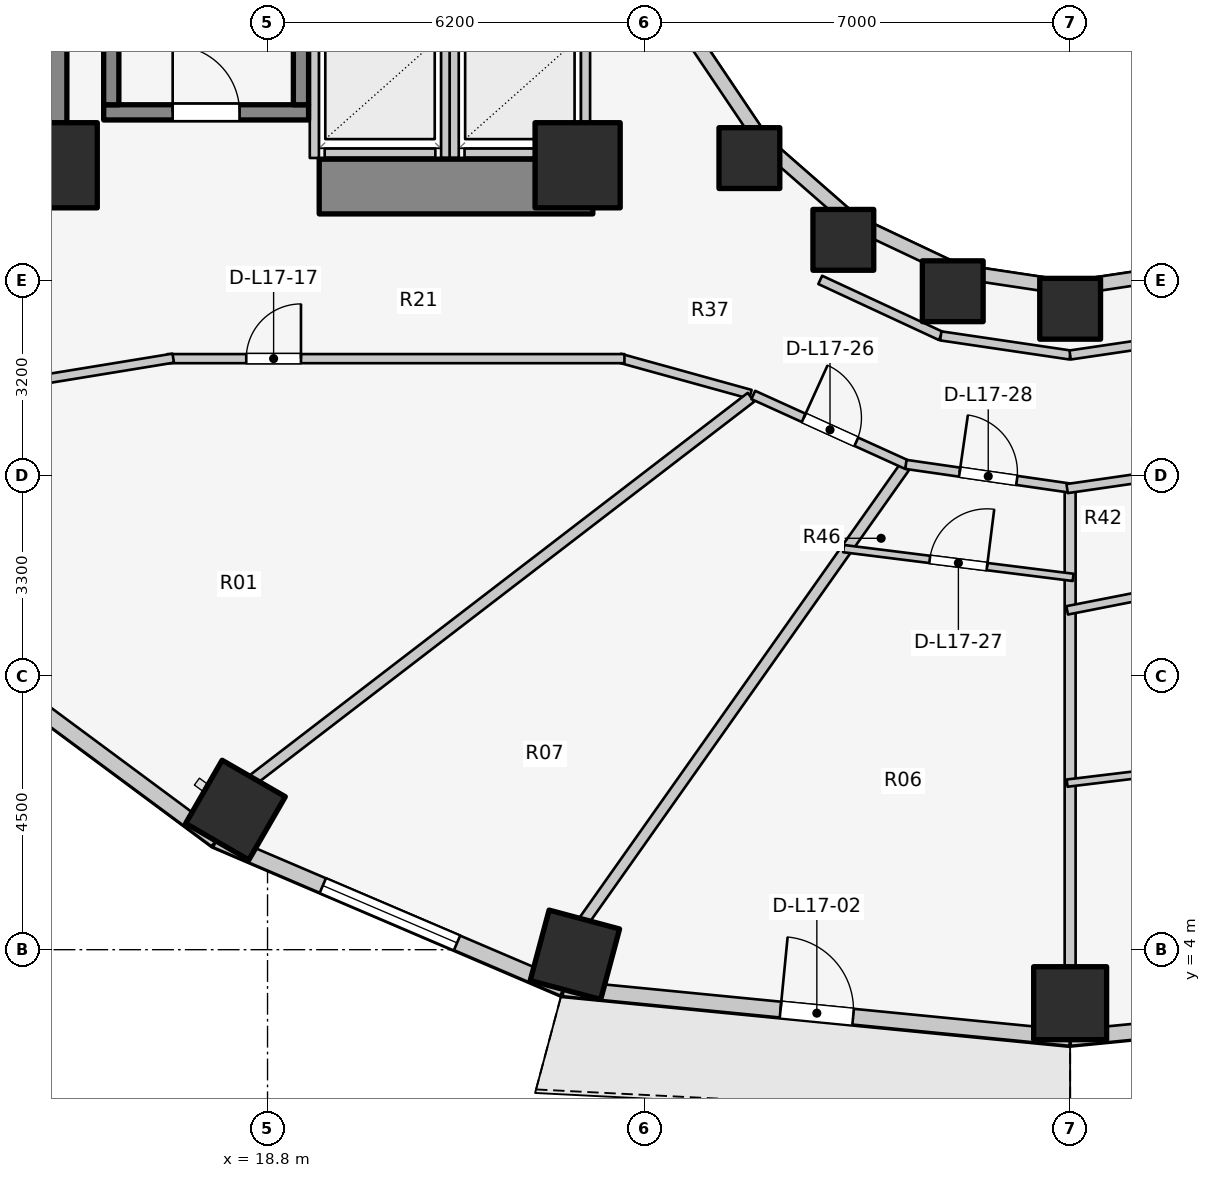
"""IFC4 building model, lengths in metres.
Left out: names, types, materials, properties, quantities, classifications, styles, units other than length and angle.
Written with IfcOpenShell. Run it as: python <this file> out.ifc"""

import sys

from ifc_helpers import new_model, si_unit, direction, frame, frame_2d, origin, origin_2d, place, context, subcontext, project, spatial, rectangle, extrude, element, fill, save


model = new_model("IFC4")
c1 = context("Model", 3, precision=1e-05, world=origin(), true_north=direction((0.0, 1.0)))
c2 = subcontext(c1, "Body", "Model", "MODEL_VIEW")
j1 = project(units=[si_unit("LENGTHUNIT", "METRE"), si_unit("PLANEANGLEUNIT", "RADIAN")], contexts=[c1])
p1 = place(None, origin())
s1 = spatial("IfcSite", under=j1, at=p1, CompositionType="ELEMENT")
p2 = place(p1, origin())
s2 = spatial("IfcBuilding", under=s1, at=p2, CompositionType="ELEMENT")
p3 = place(p2, frame((0.0, 0.0, 58.6)))
s3 = spatial("IfcBuildingStorey", under=s2, at=p3, CompositionType="ELEMENT", Elevation=58.6)
p4 = place(p3, frame((15.05, 17.05, 0.0), z_axis=(0.0, 0.0, 1.0), x_axis=(0.0, 1.0, 0.0)))
e1 = element("IfcWall", 1, at=p4, inside=s3, PredefinedType="SHEAR", context=c2, shape_type="SweptSolid", body=[
    extrude(rectangle(XDim=12.8, YDim=0.9, at=frame_2d((6.4, 0.0))), origin(), (0.0, 0.0, 1.0), 3.1),
])
p5 = place(p3, frame((19.65, 16.55, 0.0), z_axis=(0.0, 0.0, 1.0), x_axis=(1.0, 0.0, 0.0)))
e2 = element("IfcWall", 2, at=p5, inside=s3, PredefinedType="SHEAR", context=c2, shape_type="SweptSolid", body=[
    extrude(rectangle(XDim=4.5, YDim=0.9, at=frame_2d((2.25, 0.0))), origin(), (0.0, 0.0, 1.0), 3.1),
])
p6 = place(p3, frame((16.105, 17.77, 0.0), z_axis=(0.0, 0.0, 1.0), x_axis=(1.0, 0.0, 0.0)))
e3 = element("IfcWall", 3, at=p6, inside=s3, PredefinedType="SOLIDWALL", context=c2, shape_type="SweptSolid", body=[
    extrude(rectangle(XDim=3.37, YDim=0.25, at=frame_2d((1.685, 0.0))), origin(), (0.0, 0.0, 1.0), 3.1),
])
p7 = place(p6, frame((1.135, 0.0, 0.0)))
e4 = element("IfcOpeningElement", 4, at=p7, cuts=e3, PredefinedType="OPENING", context=c2, shape_type="SweptSolid", body=[
    extrude(rectangle(XDim=1.1, YDim=2.1, at=frame_2d((0.55, 1.05))), frame((0.0, 0.135, 0.0), z_axis=(0.0, -1.0, 0.0), x_axis=(1.0, 0.0, 0.0)), (0.0, 0.0, 1.0), 0.27),
])
for number, where, z_axis, x_axis in (
    (5, (16.23, 17.895, 0.0), (0.0, 0.0, 1.0), (0.0, 1.0, 0.0)),
    (6, (19.35, 17.895, 0.0), (0.0, 0.0, 1.0), (0.0, 1.0, 0.0)),
):
    element("IfcWall", number, at=place(p3, frame(where, z_axis=z_axis, x_axis=x_axis)), inside=s3, PredefinedType="SOLIDWALL", context=c2, shape_type="SweptSolid", body=[
        extrude(rectangle(XDim=7.81, YDim=0.25, at=frame_2d((3.905, 0.0))), origin(), (0.0, 0.0, 1.0), 3.1),
    ])
for number, where, z_axis, x_axis in (
    (7, (15.3, 16.9, 0.0), (0.0, 0.0, 1.0), (1.0, 0.0, 0.0)),
    (8, (23.9, 16.9, 0.0), (0.0, 0.0, 1.0), (1.0, 0.0, 0.0)),
):
    element("IfcColumn", number, at=place(p3, frame(where, z_axis=z_axis, x_axis=x_axis)), inside=s3, PredefinedType="COLUMN", context=c2, shape_type="SweptSolid", body=[
        extrude(rectangle(XDim=1.4, YDim=1.4, at=origin_2d()), origin(), (0.0, 0.0, 1.0), 3.1),
    ])
for number, where, z_axis, x_axis in (
    (9, (26.725, 17.018, 0.0), (0.0, 0.0, 1.0), (1.0, 0.0, 0.0)),
    (10, (28.27, 15.673, 0.0), (0.0, 0.0, 1.0), (1.0, 0.0, 0.0)),
):
    element("IfcColumn", number, at=place(p3, frame(where, z_axis=z_axis, x_axis=x_axis)), inside=s3, PredefinedType="COLUMN", context=c2, shape_type="SweptSolid", body=[
        extrude(rectangle(XDim=1.0, YDim=1.0, at=origin_2d()), origin(), (0.0, 0.0, 1.0), 3.1),
    ])
p8 = place(p3, frame((18.273, 6.296, 0.0), z_axis=(0.0, 0.0, 1.0), x_axis=(-0.5, -0.866025403784, 0.0)))
e11 = element("IfcColumn", 11, at=p8, inside=s3, PredefinedType="COLUMN", context=c2, shape_type="SweptSolid", body=[
    extrude(rectangle(XDim=1.2, YDim=1.2, at=origin_2d()), origin(), (0.0, 0.0, 1.0), 3.1),
])
p9 = place(p3, frame((30.069, 14.828, 0.0), z_axis=(0.0, 0.0, 1.0), x_axis=(1.0, 0.0, 0.0)))
e12 = element("IfcColumn", 12, at=p9, inside=s3, PredefinedType="COLUMN", context=c2, shape_type="SweptSolid", body=[
    extrude(rectangle(XDim=1.0, YDim=1.0, at=origin_2d()), origin(), (0.0, 0.0, 1.0), 3.1),
])
p10 = place(p3, frame((23.855, 3.916, 0.0), z_axis=(0.0, 0.0, 1.0), x_axis=(-0.258819045103, -0.965925826289, 0.0)))
e13 = element("IfcColumn", 13, at=p10, inside=s3, PredefinedType="COLUMN", context=c2, shape_type="SweptSolid", body=[
    extrude(rectangle(XDim=1.2, YDim=1.2, at=origin_2d()), origin(), (0.0, 0.0, 1.0), 3.1),
])
p11 = place(p3, frame((32.0, 14.54, 0.0), z_axis=(0.0, 0.0, 1.0), x_axis=(1.0, 0.0, 0.0)))
e14 = element("IfcColumn", 14, at=p11, inside=s3, PredefinedType="COLUMN", context=c2, shape_type="SweptSolid", body=[
    extrude(rectangle(XDim=1.0, YDim=1.0, at=origin_2d()), origin(), (0.0, 0.0, 1.0), 3.1),
])
p12 = place(p3, frame((32.0, 3.12, 0.0), z_axis=(0.0, 0.0, 1.0), x_axis=(0.0, -1.0, 0.0)))
e15 = element("IfcColumn", 15, at=p12, inside=s3, PredefinedType="COLUMN", context=c2, shape_type="SweptSolid", body=[
    extrude(rectangle(XDim=1.2, YDim=1.2, at=origin_2d()), origin(), (0.0, 0.0, 1.0), 3.1),
])
p13 = place(p3, frame((25.834, 18.94, 0.0), z_axis=(0.0, 0.0, 1.0), x_axis=(0.558197800898, -0.829707909492, 0.0)))
e16 = element("IfcWall", 16, at=p13, inside=s3, PredefinedType="STANDARD", context=c2, shape_type="SweptSolid", body=[
    extrude(rectangle(XDim=2.027, YDim=0.23, at=frame_2d((1.013, 0.0))), origin(), (0.0, 0.0, 1.0), 2.16),
])
p14 = place(p3, frame((26.965, 17.258, 0.0), z_axis=(0.0, 0.0, 1.0), x_axis=(0.752576694707, -0.658504607869, 0.0)))
e17 = element("IfcWall", 17, at=p14, inside=s3, PredefinedType="STANDARD", context=c2, shape_type="SweptSolid", body=[
    extrude(rectangle(XDim=1.959, YDim=0.23, at=frame_2d((0.98, 0.0))), origin(), (0.0, 0.0, 1.0), 2.16),
])
p15 = place(p3, frame((28.44, 15.968, 0.0), z_axis=(0.0, 0.0, 1.0), x_axis=(0.904179699603, -0.427152280606, 0.0)))
e18 = element("IfcWall", 18, at=p15, inside=s3, PredefinedType="STANDARD", context=c2, shape_type="SweptSolid", body=[
    extrude(rectangle(XDim=1.899, YDim=0.23, at=frame_2d((0.95, 0.0))), origin(), (0.0, 0.0, 1.0), 2.16),
])
for number, where, z_axis, x_axis in (
    (19, (30.157, 15.157, 0.0), (0.0, 0.0, 1.0), (0.989, -0.149, 0.0)),
    (20, (32.0, 14.88, 0.0), (0.0, 0.0, 1.0), (0.989, 0.149, 0.0)),
):
    element("IfcWall", number, at=place(p3, frame(where, z_axis=z_axis, x_axis=x_axis)), inside=s3, PredefinedType="STANDARD", context=c2, shape_type="SweptSolid", body=[
        extrude(rectangle(XDim=1.864, YDim=0.23, at=frame_2d((0.932, 0.0))), origin(), (0.0, 0.0, 1.0), 2.16),
    ])
p16 = place(p3, frame((13.595, 9.035, 0.0), z_axis=(0.0, 0.0, 1.0), x_axis=(0.803477531792, -0.595335078679, 0.0)))
e21 = element("IfcWall", 21, at=p16, inside=s3, PredefinedType="STANDARD", context=c2, shape_type="SweptSolid", body=[
    extrude(rectangle(XDim=5.43, YDim=0.26, at=frame_2d((2.715, 0.0))), origin(), (0.0, 0.0, 1.0), 2.85),
])
p17 = place(p3, frame((17.958, 5.803, 0.0), z_axis=(0.0, 0.0, 1.0), x_axis=(0.919612132394, -0.39282760335, 0.0)))
e22 = element("IfcWall", 22, at=p17, inside=s3, PredefinedType="STANDARD", context=c2, shape_type="SweptSolid", body=[
    extrude(rectangle(XDim=6.209, YDim=0.26, at=frame_2d((3.105, 0.0))), origin(), (0.0, 0.0, 1.0), 2.85),
])
p18 = place(p17, frame((1.905, 0.0, 0.75)))
e23 = element("IfcOpeningElement", 23, at=p18, cuts=e22, PredefinedType="OPENING", context=c2, shape_type="SweptSolid", body=[
    extrude(rectangle(XDim=2.4, YDim=1.7, at=frame_2d((1.2, 0.85))), frame((0.0, 0.14, 0.0), z_axis=(0.0, -1.0, 0.0), x_axis=(1.0, 0.0, 0.0)), (0.0, 0.0, 1.0), 0.28),
])
p19 = place(p3, frame((23.668, 3.364, 0.0), z_axis=(0.0, 0.0, 1.0), x_axis=(0.995247718352, -0.097375454379, 0.0)))
e24 = element("IfcWall", 24, at=p19, inside=s3, PredefinedType="STANDARD", context=c2, shape_type="SweptSolid", body=[
    extrude(rectangle(XDim=8.372, YDim=0.26, at=frame_2d((4.186, 0.0))), origin(), (0.0, 0.0, 1.0), 2.88),
])
p20 = place(p19, frame((3.586, 0.0, 0.0)))
e25 = element("IfcOpeningElement", 25, at=p20, cuts=e24, PredefinedType="OPENING", context=c2, shape_type="SweptSolid", body=[
    extrude(rectangle(XDim=1.2, YDim=2.2, at=frame_2d((0.6, 1.1))), frame((0.0, 0.14, 0.0), z_axis=(0.0, -1.0, 0.0), x_axis=(1.0, 0.0, 0.0)), (0.0, 0.0, 1.0), 0.28),
])
p21 = place(p3, frame((32.0, 2.549, 0.0), z_axis=(0.0, 0.0, 1.0), x_axis=(0.995247718352, 0.097375454379, 0.0)))
e26 = element("IfcWall", 26, at=p21, inside=s3, PredefinedType="STANDARD", context=c2, shape_type="SweptSolid", body=[
    extrude(rectangle(XDim=8.372, YDim=0.26, at=frame_2d((4.186, 0.0))), origin(), (0.0, 0.0, 1.0), 2.85),
])
p22 = place(p21, frame((3.436, 0.0, 0.75)))
e27 = element("IfcOpeningElement", 27, at=p22, cuts=e26, PredefinedType="OPENING", context=c2, shape_type="SweptSolid", body=[
    extrude(rectangle(XDim=1.5, YDim=1.6, at=frame_2d((0.75, 0.8))), frame((0.0, 0.14, 0.0), z_axis=(0.0, -1.0, 0.0), x_axis=(1.0, 0.0, 0.0)), (0.0, 0.0, 1.0), 0.28),
])
p23 = place(p3, frame((19.74, 17.1, 0.0), z_axis=(0.0, 0.0, 1.0), x_axis=(1.0, 0.0, 0.0)))
e28 = element("IfcWall", 28, at=p23, inside=s3, PredefinedType="SOLIDWALL", context=c2, shape_type="SweptSolid", body=[
    extrude(rectangle(XDim=1.82, YDim=0.15, at=frame_2d((0.91, 0.0))), origin(), (0.0, 0.0, 1.0), 2.855),
])
p24 = place(p3, frame((19.57, 17.02, 0.0), z_axis=(0.0, 0.0, 1.0), x_axis=(0.0, 1.0, 0.0)))
e29 = element("IfcWall", 29, at=p24, inside=s3, PredefinedType="SOLIDWALL", context=c2, shape_type="SweptSolid", body=[
    extrude(rectangle(XDim=2.22, YDim=0.15, at=frame_2d((1.11, 0.0))), origin(), (0.0, 0.0, 1.0), 2.12),
])
p25 = place(p3, frame((21.73, 17.02, 0.0), z_axis=(0.0, 0.0, 1.0), x_axis=(0.0, 1.0, 0.0)))
e30 = element("IfcWall", 30, at=p25, inside=s3, PredefinedType="SOLIDWALL", context=c2, shape_type="SweptSolid", body=[
    extrude(rectangle(XDim=2.22, YDim=0.15, at=frame_2d((1.11, 0.0))), origin(), (0.0, 0.0, 1.0), 2.855),
])
p26 = place(p3, frame((22.04, 17.1, 0.0), z_axis=(0.0, 0.0, 1.0), x_axis=(1.0, 0.0, 0.0)))
e31 = element("IfcWall", 31, at=p26, inside=s3, PredefinedType="SOLIDWALL", context=c2, shape_type="SweptSolid", body=[
    extrude(rectangle(XDim=1.82, YDim=0.15, at=frame_2d((0.91, 0.0))), origin(), (0.0, 0.0, 1.0), 2.12),
])
p27 = place(p3, frame((21.87, 17.02, 0.0), z_axis=(0.0, 0.0, 1.0), x_axis=(0.0, 1.0, 0.0)))
e32 = element("IfcWall", 32, at=p27, inside=s3, PredefinedType="SOLIDWALL", context=c2, shape_type="SweptSolid", body=[
    extrude(rectangle(XDim=2.22, YDim=0.15, at=frame_2d((1.11, 0.0))), origin(), (0.0, 0.0, 1.0), 2.855),
])
p28 = place(p3, frame((24.03, 17.02, 0.0), z_axis=(0.0, 0.0, 1.0), x_axis=(0.0, 1.0, 0.0)))
e33 = element("IfcWall", 33, at=p28, inside=s3, PredefinedType="SOLIDWALL", context=c2, shape_type="SweptSolid", body=[
    extrude(rectangle(XDim=2.22, YDim=0.15, at=frame_2d((1.11, 0.0))), origin(), (0.0, 0.0, 1.0), 2.12),
])
p29 = place(p3, frame((27.89, 15.015, 0.0), z_axis=(0.0, 0.0, 1.0), x_axis=(0.906943449489, -0.421252393975, 0.0)))
e34 = element("IfcWall", 34, at=p29, inside=s3, PredefinedType="PARTITIONING", context=c2, shape_type="SweptSolid", body=[
    extrude(rectangle(XDim=2.186, YDim=0.15, at=frame_2d((1.093, 0.0))), origin(), (0.0, 0.0, 1.0), 2.237),
])
for number, where, z_axis, x_axis in (
    (35, (29.873, 14.094, 0.0), (0.0, 0.0, 1.0), (0.989, -0.146, 0.0)),
    (36, (32.0, 13.78, 0.0), (0.0, 0.0, 1.0), (0.989, 0.146, 0.0)),
):
    element("IfcWall", number, at=place(p3, frame(where, z_axis=z_axis, x_axis=x_axis)), inside=s3, PredefinedType="PARTITIONING", context=c2, shape_type="SweptSolid", body=[
        extrude(rectangle(XDim=2.151, YDim=0.15, at=frame_2d((1.075, 0.0))), origin(), (0.0, 0.0, 1.0), 2.237),
    ])
p30 = place(p3, frame((26.742, 13.133, 0.0), z_axis=(0.0, 0.0, 1.0), x_axis=(-0.963833843713, 0.266503886865, 0.0)))
e37 = element("IfcWall", 37, at=p30, inside=s3, PredefinedType="PARTITIONING", context=c2, shape_type="SweptSolid", body=[
    extrude(rectangle(XDim=2.232, YDim=0.15, at=frame_2d((1.116, 0.0))), origin(), (0.0, 0.0, 1.0), 2.237),
])
p31 = place(p3, frame((17.15, 13.72, 0.0), z_axis=(0.0, 0.0, 1.0), x_axis=(1.0, 0.0, 0.0)))
e38 = element("IfcWall", 38, at=p31, inside=s3, PredefinedType="PARTITIONING", context=c2, shape_type="SweptSolid", body=[
    extrude(rectangle(XDim=7.52, YDim=0.15, at=frame_2d((3.76, 0.0))), origin(), (0.0, 0.0, 1.0), 2.237),
])
p32 = place(p31, frame((1.3, 0.0, 0.0)))
e39 = element("IfcOpeningElement", 39, at=p32, cuts=e38, PredefinedType="OPENING", context=c2, shape_type="SweptSolid", body=[
    extrude(rectangle(XDim=0.9, YDim=2.1, at=frame_2d((0.45, 1.05))), frame((0.0, 0.085, 0.0), z_axis=(0.0, -1.0, 0.0), x_axis=(1.0, 0.0, 0.0)), (0.0, 0.0, 1.0), 0.17),
])
p33 = place(p3, frame((17.249, 13.728, 0.0), z_axis=(0.0, 0.0, 1.0), x_axis=(-0.98693078372, -0.161144742846, 0.0)))
e40 = element("IfcWall", 40, at=p33, inside=s3, PredefinedType="PARTITIONING", context=c2, shape_type="SweptSolid", body=[
    extrude(rectangle(XDim=7.557, YDim=0.15, at=frame_2d((3.779, 0.0))), origin(), (0.0, 0.0, 1.0), 2.069),
])
p34 = place(p3, frame((26.751, 13.085, 0.0), z_axis=(0.0, 0.0, 1.0), x_axis=(-0.793181014702, -0.608985942298, 0.0)))
e41 = element("IfcWall", 41, at=p34, inside=s3, PredefinedType="PARTITIONING", context=c2, shape_type="SweptSolid", body=[
    extrude(rectangle(XDim=10.324, YDim=0.18, at=frame_2d((5.162, 0.0))), origin(), (0.0, 0.0, 1.0), 2.237),
])
p35 = place(p3, frame((29.274, 11.934, 0.0), z_axis=(0.0, 0.0, 1.0), x_axis=(-0.577036915124, -0.816718065543, 0.0)))
e42 = element("IfcWall", 42, at=p35, inside=s3, PredefinedType="PARTITIONING", context=c2, shape_type="SweptSolid", body=[
    extrude(rectangle(XDim=9.131, YDim=0.18, at=frame_2d((4.565, 0.0))), origin(), (0.0, 0.0, 1.0), 2.237),
])
p36 = place(p3, frame((32.0, 11.535, 0.0), z_axis=(0.0, 0.0, 1.0), x_axis=(0.0, -1.0, 0.0)))
e43 = element("IfcWall", 43, at=p36, inside=s3, PredefinedType="PARTITIONING", context=c2, shape_type="SweptSolid", body=[
    extrude(rectangle(XDim=7.835, YDim=0.18, at=frame_2d((3.917, 0.0))), origin(), (0.0, 0.0, 1.0), 2.237),
])
p37 = place(p3, frame((26.789, 13.123, 0.0), z_axis=(0.0, 0.0, 1.0), x_axis=(0.910568469686, -0.41335827319, 0.0)))
e44 = element("IfcWall", 44, at=p37, inside=s3, PredefinedType="PARTITIONING", context=c2, shape_type="SweptSolid", body=[
    extrude(rectangle(XDim=2.772, YDim=0.15, at=frame_2d((1.386, 0.0))), origin(), (0.0, 0.0, 1.0), 2.237),
])
p38 = place(p37, frame((0.911, 0.0, 0.0)))
e45 = element("IfcOpeningElement", 45, at=p38, cuts=e44, PredefinedType="OPENING", context=c2, shape_type="SweptSolid", body=[
    extrude(rectangle(XDim=0.95, YDim=2.1, at=frame_2d((0.475, 1.05))), frame((0.0, 0.085, 0.0), z_axis=(0.0, -1.0, 0.0), x_axis=(1.0, 0.0, 0.0)), (0.0, 0.0, 1.0), 0.17),
])
p39 = place(p3, frame((28.274, 10.596, 0.0), z_axis=(0.0, 0.0, 1.0), x_axis=(0.992245264378, -0.124295355177, 0.0)))
e46 = element("IfcWall", 46, at=p39, inside=s3, PredefinedType="MOVABLE", context=c2, shape_type="SweptSolid", body=[
    extrude(rectangle(XDim=3.805, YDim=0.12, at=frame_2d((1.902, 0.0))), origin(), (0.0, 0.0, 1.0), 2.237),
])
p40 = place(p39, frame((1.427, 0.0, 0.0)))
e47 = element("IfcOpeningElement", 47, at=p40, cuts=e46, PredefinedType="OPENING", context=c2, shape_type="SweptSolid", body=[
    extrude(rectangle(XDim=0.95, YDim=2.1, at=frame_2d((0.475, 1.05))), frame((0.0, 0.07, 0.0), z_axis=(0.0, -1.0, 0.0), x_axis=(1.0, 0.0, 0.0)), (0.0, 0.0, 1.0), 0.14),
])
p41 = place(p3, frame((29.299, 11.981, 0.0), z_axis=(0.0, 0.0, 1.0), x_axis=(0.989748682384, -0.142819976611, 0.0)))
e48 = element("IfcWall", 48, at=p41, inside=s3, PredefinedType="PARTITIONING", context=c2, shape_type="SweptSolid", body=[
    extrude(rectangle(XDim=2.737, YDim=0.15, at=frame_2d((1.368, 0.0))), origin(), (0.0, 0.0, 1.0), 2.237),
])
p42 = place(p41, frame((0.893, 0.0, 0.0)))
e49 = element("IfcOpeningElement", 49, at=p42, cuts=e48, PredefinedType="OPENING", context=c2, shape_type="SweptSolid", body=[
    extrude(rectangle(XDim=0.95, YDim=2.1, at=frame_2d((0.475, 1.05))), frame((0.0, 0.085, 0.0), z_axis=(0.0, -1.0, 0.0), x_axis=(1.0, 0.0, 0.0)), (0.0, 0.0, 1.0), 0.17),
])
p43 = place(p3, frame((31.95, 6.739, 0.0), z_axis=(0.0, 0.0, 1.0), x_axis=(0.992797021108, 0.11980849252, 0.0)))
e50 = element("IfcWall", 50, at=p43, inside=s3, PredefinedType="MOVABLE", context=c2, shape_type="SweptSolid", body=[
    extrude(rectangle(XDim=4.978, YDim=0.12, at=frame_2d((2.489, 0.0))), origin(), (0.0, 0.0, 1.0), 2.237),
])
p44 = place(p3, frame((31.95, 11.583, 0.0), z_axis=(0.0, 0.0, 1.0), x_axis=(0.989761784218, 0.142729150844, 0.0)))
e51 = element("IfcWall", 51, at=p44, inside=s3, PredefinedType="PARTITIONING", context=c2, shape_type="SweptSolid", body=[
    extrude(rectangle(XDim=2.822, YDim=0.15, at=frame_2d((1.411, 0.0))), origin(), (0.0, 0.0, 1.0), 2.237),
])
p45 = place(p3, frame((31.951, 9.58, 0.0), z_axis=(0.0, 0.0, 1.0), x_axis=(0.981274848728, 0.19261274946, 0.0)))
e52 = element("IfcWall", 52, at=p45, inside=s3, PredefinedType="PLUMBINGWALL", context=c2, shape_type="SweptSolid", body=[
    extrude(rectangle(XDim=4.022, YDim=0.14, at=frame_2d((2.011, 0.0))), origin(), (0.0, 0.0, 1.0), 2.237),
])
p46 = place(p45, frame((1.561, 0.0, 0.0)))
e53 = element("IfcOpeningElement", 53, at=p46, cuts=e52, PredefinedType="OPENING", context=c2, shape_type="SweptSolid", body=[
    extrude(rectangle(XDim=0.9, YDim=2.1, at=frame_2d((0.45, 1.05))), frame((0.0, 0.08, 0.0), z_axis=(0.0, -1.0, 0.0), x_axis=(1.0, 0.0, 0.0)), (0.0, 0.0, 1.0), 0.16),
])
p47 = place(p18, origin())
e54 = element("IfcWindow", 54, at=p47, inside=s3, PartitioningType="SINGLE_PANEL", PredefinedType="WINDOW", context=c2, shape_type="SweptSolid", body=[
    extrude(rectangle(XDim=2.4, YDim=1.7, at=frame_2d((1.2, 0.85))), frame((0.0, 0.03, 0.0), z_axis=(0.0, -1.0, 0.0), x_axis=(1.0, 0.0, 0.0)), (0.0, 0.0, 1.0), 0.06),
])
fill(e23, e54)
p48 = place(p20, origin())
e55 = element("IfcDoor", 55, at=p48, inside=s3, OperationType="SINGLE_SWING_LEFT", PredefinedType="DOOR", context=c2, shape_type="SweptSolid", body=[
    extrude(rectangle(XDim=1.2, YDim=2.2, at=frame_2d((0.6, 1.1))), frame((0.0, 0.025, 0.0), z_axis=(0.0, -1.0, 0.0), x_axis=(1.0, 0.0, 0.0)), (0.0, 0.0, 1.0), 0.05),
])
fill(e25, e55)
p49 = place(p7, origin())
e56 = element("IfcDoor", 56, at=p49, inside=s3, OperationType="SINGLE_SWING_LEFT", PredefinedType="DOOR", context=c2, shape_type="SweptSolid", body=[
    extrude(rectangle(XDim=1.1, YDim=2.1, at=frame_2d((0.55, 1.05))), frame((0.0, 0.025, 0.0), z_axis=(0.0, -1.0, 0.0), x_axis=(1.0, 0.0, 0.0)), (0.0, 0.0, 1.0), 0.05),
])
fill(e4, e56)
p50 = place(p32, origin())
e57 = element("IfcDoor", 57, at=p50, inside=s3, OperationType="SINGLE_SWING_RIGHT", PredefinedType="DOOR", context=c2, shape_type="SweptSolid", body=[
    extrude(rectangle(XDim=0.9, YDim=2.1, at=frame_2d((0.45, 1.05))), frame((0.0, 0.025, 0.0), z_axis=(0.0, -1.0, 0.0), x_axis=(1.0, 0.0, 0.0)), (0.0, 0.0, 1.0), 0.05),
])
fill(e39, e57)
p51 = place(p38, origin())
e58 = element("IfcDoor", 58, at=p51, inside=s3, OperationType="SINGLE_SWING_LEFT", PredefinedType="DOOR", context=c2, shape_type="SweptSolid", body=[
    extrude(rectangle(XDim=0.95, YDim=2.1, at=frame_2d((0.475, 1.05))), frame((0.0, 0.025, 0.0), z_axis=(0.0, -1.0, 0.0), x_axis=(1.0, 0.0, 0.0)), (0.0, 0.0, 1.0), 0.05),
])
fill(e45, e58)
p52 = place(p40, origin())
e59 = element("IfcDoor", 59, at=p52, inside=s3, OperationType="SINGLE_SWING_RIGHT", PredefinedType="DOOR", context=c2, shape_type="SweptSolid", body=[
    extrude(rectangle(XDim=0.95, YDim=2.1, at=frame_2d((0.475, 1.05))), frame((0.0, 0.025, 0.0), z_axis=(0.0, -1.0, 0.0), x_axis=(1.0, 0.0, 0.0)), (0.0, 0.0, 1.0), 0.05),
])
fill(e47, e59)
p53 = place(p42, origin())
e60 = element("IfcDoor", 60, at=p53, inside=s3, OperationType="SINGLE_SWING_LEFT", PredefinedType="DOOR", context=c2, shape_type="SweptSolid", body=[
    extrude(rectangle(XDim=0.95, YDim=2.1, at=frame_2d((0.475, 1.05))), frame((0.0, 0.025, 0.0), z_axis=(0.0, -1.0, 0.0), x_axis=(1.0, 0.0, 0.0)), (0.0, 0.0, 1.0), 0.05),
])
fill(e49, e60)
save(model, sys.argv[1])
